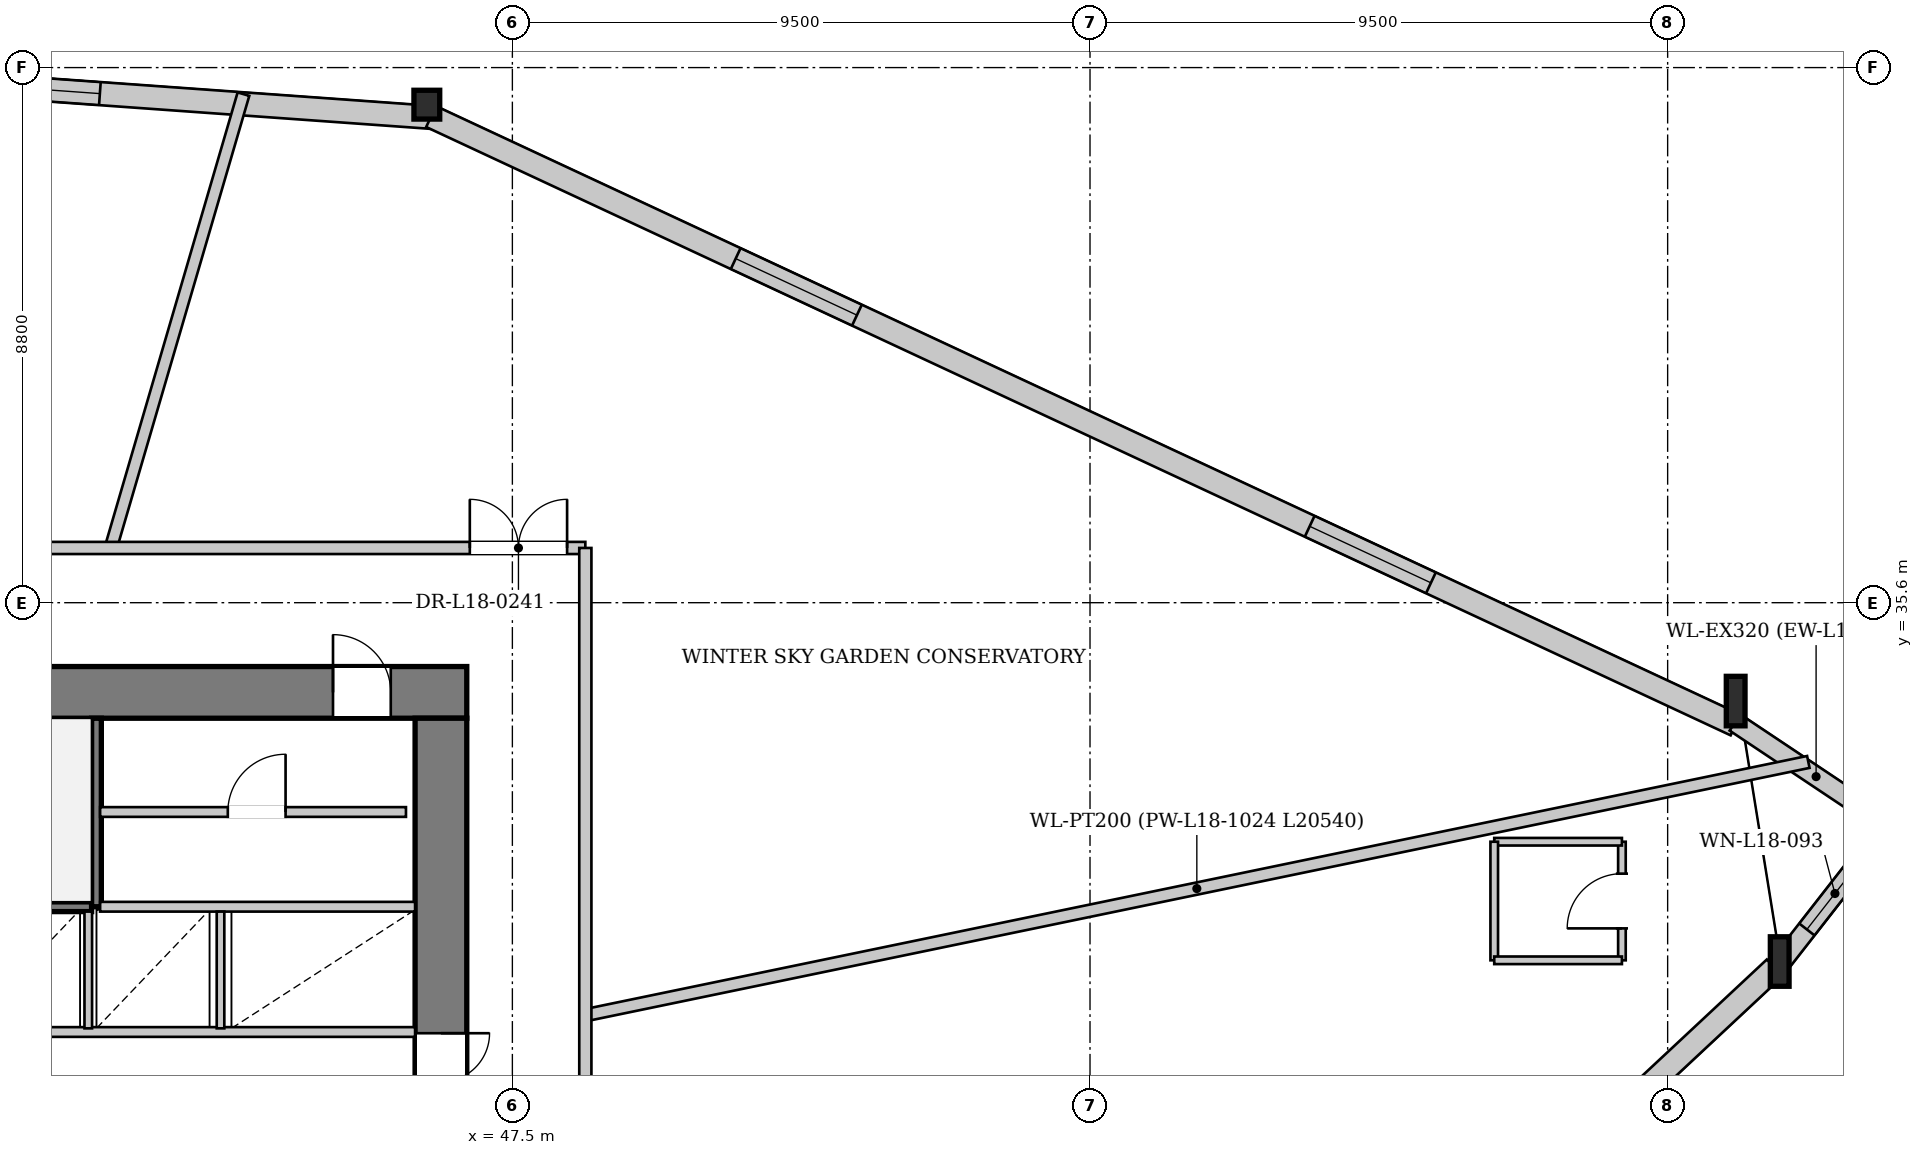
"""IFC4 building model, lengths in metres.
Left out: names, types, materials, properties, quantities, classifications, styles, units other than length and angle.
Written with IfcOpenShell. Run it as: python <this file> out.ifc"""

import sys

from ifc_helpers import new_model, si_unit, direction, frame, frame_2d, origin, origin_2d, place, context, subcontext, project, spatial, rectangle, i_section, extrude, source, transform, mapped, element, fill, save


model = new_model("IFC4")
c1 = context("Model", 3, precision=1e-05, world=origin(), true_north=direction((0.0, 1.0)))
c2 = subcontext(c1, "Body", "Model", "MODEL_VIEW")
j1 = project(units=[si_unit("LENGTHUNIT", "METRE"), si_unit("PLANEANGLEUNIT", "RADIAN")], contexts=[c1])
p1 = place(None, origin())
s1 = spatial("IfcSite", under=j1, at=p1, CompositionType="ELEMENT")
p2 = place(p1, origin())
s2 = spatial("IfcBuilding", under=s1, at=p2, CompositionType="ELEMENT")
p3 = place(p2, frame((0.0, 0.0, 71.9)))
s3 = spatial("IfcBuildingStorey", under=s2, at=p3, CompositionType="ELEMENT", Elevation=71.9)
m1 = source(origin(), c2, "Body", "SweptSolid", [
    extrude(i_section(OverallWidth=0.308, OverallDepth=0.814, WebThickness=0.021, FlangeThickness=0.04, at=origin_2d()), origin(), (0.0, 0.0, 1.0), 3.867),
])
p4 = place(p3, frame((68.391, 29.455, 0.0), z_axis=(-0.024620663351, 0.126133552244, 0.991707693796), x_axis=(-0.981477077245, -0.191579609672, 0.0)))
e1 = element("IfcColumn", 1, at=p4, inside=s3, PredefinedType="COLUMN", context=c2, shape_type="MappedRepresentation", body=[
    mapped(m1, transform((0.0, 0.0, 0.0), x_axis=(1.0, 0.0, 0.0), y_axis=(0.0, 1.0, 0.0), z_axis=(0.0, 0.0, 1.0), scale=1.0)),
])
m2 = source(origin(), c2, "Body", "SweptSolid", [
    extrude(i_section(OverallWidth=0.308, OverallDepth=0.814, WebThickness=0.021, FlangeThickness=0.04, at=origin_2d()), origin(), (0.0, 0.0, 1.0), 3.863),
])
p5 = place(p3, frame((67.697, 33.763, 0.0), z_axis=(-0.040443883228, 0.113558840876, 0.992707752548), x_axis=(-0.942038054794, -0.335506040661, 0.0)))
e2 = element("IfcColumn", 2, at=p5, inside=s3, PredefinedType="COLUMN", context=c2, shape_type="MappedRepresentation", body=[
    mapped(m2, transform((0.0, 0.0, 0.0), x_axis=(1.0, 0.0, 0.0), y_axis=(0.0, 1.0, 0.0), z_axis=(0.0, 0.0, 1.0), scale=1.0)),
])
m3 = source(origin(), c2, "Body", "SweptSolid", [
    extrude(i_section(OverallWidth=0.424, OverallDepth=0.474, WebThickness=0.043, FlangeThickness=0.068, at=origin_2d()), origin(), (0.0, 0.0, 1.0), 3.847),
])
p6 = place(p3, frame((46.243, 43.767, 0.0), z_axis=(-0.07792844441, 0.011930413314, 0.996887567778), x_axis=(-0.151331289077, -0.988483100992, 0.0)))
e3 = element("IfcColumn", 3, at=p6, inside=s3, PredefinedType="COLUMN", context=c2, shape_type="MappedRepresentation", body=[
    mapped(m3, transform((0.0, 0.0, 0.0), x_axis=(1.0, 0.0, 0.0), y_axis=(0.0, 1.0, 0.0), z_axis=(0.0, 0.0, 1.0), scale=1.0)),
])
p7 = place(p3, frame((22.618, 45.267, 0.0), z_axis=(0.0, 0.0, 1.0), x_axis=(0.997450631022, -0.071359923443, 0.0)))
e4 = element("IfcWall", 4, at=p7, inside=s3, PredefinedType="SOLIDWALL", context=c2, shape_type="SweptSolid", body=[
    extrude(rectangle(XDim=23.672, YDim=0.38, at=frame_2d((11.836, 0.0))), origin(), (0.0, 0.0, 1.0), 3.042),
])
p8 = place(p7, frame((5.528, 0.0, 0.65)))
e5 = element("IfcOpeningElement", 5, at=p8, cuts=e4, PredefinedType="OPENING", context=c2, shape_type="SweptSolid", body=[
    extrude(rectangle(XDim=2.2, YDim=2.25, at=frame_2d((1.1, 1.125))), frame((0.0, 0.2, 0.0), z_axis=(0.0, -1.0, 0.0), x_axis=(1.0, 0.0, 0.0)), (0.0, 0.0, 1.0), 0.4),
])
p9 = place(p7, frame((15.944, 0.0, 0.65)))
e6 = element("IfcOpeningElement", 6, at=p9, cuts=e4, PredefinedType="OPENING", context=c2, shape_type="SweptSolid", body=[
    extrude(rectangle(XDim=2.2, YDim=2.25, at=frame_2d((1.1, 1.125))), frame((0.0, 0.2, 0.0), z_axis=(0.0, -1.0, 0.0), x_axis=(1.0, 0.0, 0.0)), (0.0, 0.0, 1.0), 0.4),
])
p10 = place(p3, frame((46.163, 43.595, 0.0), z_axis=(0.0, 0.0, 1.0), x_axis=(0.906302989161, -0.422628550667, 0.0)))
e7 = element("IfcWall", 7, at=p10, inside=s3, PredefinedType="SOLIDWALL", context=c2, shape_type="SweptSolid", body=[
    extrude(rectangle(XDim=23.672, YDim=0.38, at=frame_2d((11.836, 0.0))), origin(), (0.0, 0.0, 1.0), 3.042),
])
p11 = place(p10, frame((5.528, 0.0, 0.65)))
e8 = element("IfcOpeningElement", 8, at=p11, cuts=e7, PredefinedType="OPENING", context=c2, shape_type="SweptSolid", body=[
    extrude(rectangle(XDim=2.2, YDim=2.25, at=frame_2d((1.1, 1.125))), frame((0.0, 0.2, 0.0), z_axis=(0.0, -1.0, 0.0), x_axis=(1.0, 0.0, 0.0)), (0.0, 0.0, 1.0), 0.4),
])
p12 = place(p10, frame((15.944, 0.0, 0.65)))
e9 = element("IfcOpeningElement", 9, at=p12, cuts=e7, PredefinedType="OPENING", context=c2, shape_type="SweptSolid", body=[
    extrude(rectangle(XDim=2.2, YDim=2.25, at=frame_2d((1.1, 1.125))), frame((0.0, 0.2, 0.0), z_axis=(0.0, -1.0, 0.0), x_axis=(1.0, 0.0, 0.0)), (0.0, 0.0, 1.0), 0.4),
])
p13 = place(p3, frame((67.608, 33.63, 0.0), z_axis=(0.0, 0.0, 1.0), x_axis=(0.831757330832, -0.55513939025, 0.0)))
e10 = element("IfcWall", 10, at=p13, inside=s3, PredefinedType="SOLIDWALL", context=c2, shape_type="SweptSolid", body=[
    extrude(rectangle(XDim=3.207, YDim=0.32, at=frame_2d((1.603, 0.0))), origin(), (0.0, 0.0, 1.0), 3.042),
])
p14 = place(p3, frame((70.238, 32.081, 0.0), z_axis=(0.0, 0.0, 1.0), x_axis=(-0.615310089373, -0.788285160279, 0.0)))
e11 = element("IfcWall", 11, at=p14, inside=s3, PredefinedType="SOLIDWALL", context=c2, shape_type="SweptSolid", body=[
    extrude(rectangle(XDim=3.207, YDim=0.32, at=frame_2d((1.604, 0.0))), origin(), (0.0, 0.0, 1.0), 3.042),
])
p15 = place(p14, frame((0.853, 0.0, 0.622)))
e12 = element("IfcOpeningElement", 12, at=p15, cuts=e11, PredefinedType="OPENING", context=c2, shape_type="SweptSolid", body=[
    extrude(rectangle(XDim=1.5, YDim=2.3, at=frame_2d((0.75, 1.15))), frame((0.0, 0.17, 0.0), z_axis=(0.0, -1.0, 0.0), x_axis=(1.0, 0.0, 0.0)), (0.0, 0.0, 1.0), 0.34),
])
p16 = place(p3, frame((68.261, 29.594, 0.0), z_axis=(0.0, 0.0, 1.0), x_axis=(-0.730910825088, -0.682472978051, 0.0)))
e13 = element("IfcWall", 13, at=p16, inside=s3, PredefinedType="SOLIDWALL", context=c2, shape_type="SweptSolid", body=[
    extrude(rectangle(XDim=24.284, YDim=0.38, at=frame_2d((12.142, 0.0))), origin(), (0.0, 0.0, 1.0), 3.042),
])
p17 = place(p16, frame((5.7, 0.0, 0.65)))
e14 = element("IfcOpeningElement", 14, at=p17, cuts=e13, PredefinedType="OPENING", context=c2, shape_type="SweptSolid", body=[
    extrude(rectangle(XDim=2.2, YDim=2.25, at=frame_2d((1.1, 1.125))), frame((0.0, 0.2, 0.0), z_axis=(0.0, -1.0, 0.0), x_axis=(1.0, 0.0, 0.0)), (0.0, 0.0, 1.0), 0.4),
])
p18 = place(p16, frame((17.485, 0.0, 0.65)))
e15 = element("IfcOpeningElement", 15, at=p18, cuts=e13, PredefinedType="OPENING", context=c2, shape_type="SweptSolid", body=[
    extrude(rectangle(XDim=2.2, YDim=2.25, at=frame_2d((1.1, 1.125))), frame((0.0, 0.2, 0.0), z_axis=(0.0, -1.0, 0.0), x_axis=(1.0, 0.0, 0.0)), (0.0, 0.0, 1.0), 0.4),
])
p19 = place(p3, frame((29.25, 34.125, 0.0), z_axis=(0.0, 0.0, 1.0), x_axis=(1.0, 0.0, 0.0)))
e16 = element("IfcWall", 16, at=p19, inside=s3, PredefinedType="SHEAR", context=c2, shape_type="SweptSolid", body=[
    extrude(rectangle(XDim=17.5, YDim=0.85, at=frame_2d((8.75, 0.0))), origin(), (0.0, 0.0, 1.0), 3.75),
])
p20 = place(p19, frame((1.85, 0.0, 0.0)))
e17 = element("IfcOpeningElement", 17, at=p20, cuts=e16, PredefinedType="OPENING", context=c2, shape_type="SweptSolid", body=[
    extrude(rectangle(XDim=0.95, YDim=2.1, at=frame_2d((0.475, 1.05))), frame((0.0, 0.435, 0.0), z_axis=(0.0, -1.0, 0.0), x_axis=(1.0, 0.0, 0.0)), (0.0, 0.0, 1.0), 0.87),
])
p21 = place(p19, frame((4.23, 0.0, 0.0)))
e18 = element("IfcOpeningElement", 18, at=p21, cuts=e16, PredefinedType="OPENING", context=c2, shape_type="SweptSolid", body=[
    extrude(rectangle(XDim=1.32, YDim=2.2, at=frame_2d((0.66, 1.1))), frame((0.0, 0.435, 0.0), z_axis=(0.0, -1.0, 0.0), x_axis=(1.0, 0.0, 0.0)), (0.0, 0.0, 1.0), 0.87),
])
p22 = place(p19, frame((15.3, 0.0, 0.0)))
e19 = element("IfcOpeningElement", 19, at=p22, cuts=e16, PredefinedType="OPENING", context=c2, shape_type="SweptSolid", body=[
    extrude(rectangle(XDim=0.95, YDim=2.1, at=frame_2d((0.475, 1.05))), frame((0.0, 0.435, 0.0), z_axis=(0.0, -1.0, 0.0), x_axis=(1.0, 0.0, 0.0)), (0.0, 0.0, 1.0), 0.87),
])
p23 = place(p3, frame((46.325, 33.7, 0.0), z_axis=(0.0, 0.0, 1.0), x_axis=(0.0, -1.0, 0.0)))
e20 = element("IfcWall", 20, at=p23, inside=s3, PredefinedType="SHEAR", context=c2, shape_type="SweptSolid", body=[
    extrude(rectangle(XDim=14.2, YDim=0.85, at=frame_2d((7.1, 0.0))), origin(), (0.0, 0.0, 1.0), 3.75),
])
p24 = place(p23, frame((5.18, 0.0, 0.0)))
e21 = element("IfcOpeningElement", 21, at=p24, cuts=e20, PredefinedType="OPENING", context=c2, shape_type="SweptSolid", body=[
    extrude(rectangle(XDim=1.6, YDim=2.2, at=frame_2d((0.8, 1.1))), frame((0.0, 0.435, 0.0), z_axis=(0.0, -1.0, 0.0), x_axis=(1.0, 0.0, 0.0)), (0.0, 0.0, 1.0), 0.87),
])
p25 = place(p3, frame((33.28, 30.6, 0.0), z_axis=(0.0, 0.0, 1.0), x_axis=(1.0, 0.0, 0.0)))
e22 = element("IfcWall", 22, at=p25, inside=s3, PredefinedType="PARTITIONING", context=c2, shape_type="SweptSolid", body=[
    extrude(rectangle(XDim=7.3, YDim=0.16, at=frame_2d((3.65, 0.0))), origin(), (0.0, 0.0, 1.0), 3.75),
])
p26 = place(p3, frame((40.66, 30.6, 0.0), z_axis=(0.0, 0.0, 1.0), x_axis=(0.0, 1.0, 0.0)))
e23 = element("IfcWall", 23, at=p26, inside=s3, PredefinedType="PARTITIONING", context=c2, shape_type="SweptSolid", body=[
    extrude(rectangle(XDim=3.1, YDim=0.16, at=frame_2d((1.55, 0.0))), origin(), (0.0, 0.0, 1.0), 3.75),
])
p27 = place(p3, frame((33.28, 28.54, 0.0), z_axis=(0.0, 0.0, 1.0), x_axis=(1.0, 0.0, 0.0)))
e24 = element("IfcWall", 24, at=p27, inside=s3, PredefinedType="PARTITIONING", context=c2, shape_type="SweptSolid", body=[
    extrude(rectangle(XDim=12.62, YDim=0.16, at=frame_2d((6.31, 0.0))), origin(), (0.0, 0.0, 1.0), 3.75),
])
p28 = place(p3, frame((40.72, 30.6, 0.0), z_axis=(0.0, 0.0, 1.0), x_axis=(1.0, 0.0, 0.0)))
e25 = element("IfcWall", 25, at=p28, inside=s3, PredefinedType="PARTITIONING", context=c2, shape_type="SweptSolid", body=[
    extrude(rectangle(XDim=5.18, YDim=0.16, at=frame_2d((2.59, 0.0))), origin(), (0.0, 0.0, 1.0), 3.75),
])
for number, where, z_axis, x_axis in (
    (26, (40.525, 28.6, 0.0), (0.0, 0.0, 1.0), (0.0, 1.0, 0.0)),
    (27, (42.7, 28.6, 0.0), (0.0, 0.0, 1.0), (0.0, 1.0, 0.0)),
):
    element("IfcWall", number, at=place(p3, frame(where, z_axis=z_axis, x_axis=x_axis)), inside=s3, PredefinedType="PARTITIONING", context=c2, shape_type="SweptSolid", body=[
        extrude(rectangle(XDim=1.92, YDim=0.125, at=frame_2d((0.96, 0.0))), origin(), (0.0, 0.0, 1.0), 3.75),
    ])
p29 = place(p3, frame((40.72, 32.158, 0.0), z_axis=(0.0, 0.0, 1.0), x_axis=(1.0, 0.0, 0.0)))
e28 = element("IfcWall", 28, at=p29, inside=s3, PredefinedType="PARTITIONING", context=c2, shape_type="SweptSolid", body=[
    extrude(rectangle(XDim=5.03, YDim=0.16, at=frame_2d((2.515, 0.0))), origin(), (0.0, 0.0, 1.0), 3.75),
])
p30 = place(p29, frame((2.1, 0.0, 0.0)))
e29 = element("IfcOpeningElement", 29, at=p30, cuts=e28, PredefinedType="OPENING", context=c2, shape_type="SweptSolid", body=[
    extrude(rectangle(XDim=0.95, YDim=2.1, at=frame_2d((0.475, 1.05))), frame((0.0, 0.09, 0.0), z_axis=(0.0, -1.0, 0.0), x_axis=(1.0, 0.0, 0.0)), (0.0, 0.0, 1.0), 0.18),
])
p31 = place(p3, frame((48.7, 28.816, 0.0), z_axis=(0.0, 0.0, 1.0), x_axis=(0.979223566827, 0.202783643746, 0.0)))
e30 = element("IfcWall", 30, at=p31, inside=s3, PredefinedType="PARTITIONING", context=c2, shape_type="SweptSolid", body=[
    extrude(rectangle(XDim=20.541, YDim=0.2, at=frame_2d((10.27, 0.0))), origin(), (0.0, 0.0, 1.0), 3.245),
])
p32 = place(p3, frame((40.895, 36.5, 0.0), z_axis=(0.0, 0.0, 1.0), x_axis=(0.280658217251, 0.959807775072, 0.0)))
e31 = element("IfcWall", 31, at=p32, inside=s3, PredefinedType="PARTITIONING", context=c2, shape_type="SweptSolid", body=[
    extrude(rectangle(XDim=7.776, YDim=0.2, at=frame_2d((3.888, 0.0))), origin(), (0.0, 0.0, 1.0), 3.75),
])
p33 = place(p3, frame((65.748, 29.719, 0.0), z_axis=(0.0, 0.0, 1.0), x_axis=(0.0, 1.0, 0.0)))
e32 = element("IfcWall", 32, at=p33, inside=s3, PredefinedType="PARTITIONING", context=c2, shape_type="SweptSolid", body=[
    extrude(rectangle(XDim=1.95, YDim=0.125, at=frame_2d((0.975, 0.0))), origin(), (0.0, 0.0, 1.0), 3.75),
])
p34 = place(p33, frame((0.525, 0.0, 0.0)))
e33 = element("IfcOpeningElement", 33, at=p34, cuts=e32, PredefinedType="OPENING", context=c2, shape_type="SweptSolid", body=[
    extrude(rectangle(XDim=0.9, YDim=2.1, at=frame_2d((0.45, 1.05))), frame((0.0, 0.073, 0.0), z_axis=(0.0, -1.0, 0.0), x_axis=(1.0, 0.0, 0.0)), (0.0, 0.0, 1.0), 0.145),
])
p35 = place(p3, frame((65.748, 31.669, 0.0), z_axis=(0.0, 0.0, 1.0), x_axis=(-1.0, 0.0, 0.0)))
e34 = element("IfcWall", 34, at=p35, inside=s3, PredefinedType="PARTITIONING", context=c2, shape_type="SweptSolid", body=[
    extrude(rectangle(XDim=2.1, YDim=0.125, at=frame_2d((1.05, 0.0))), origin(), (0.0, 0.0, 1.0), 3.245),
])
p36 = place(p3, frame((63.648, 31.669, 0.0), z_axis=(0.0, 0.0, 1.0), x_axis=(0.0, -1.0, 0.0)))
e35 = element("IfcWall", 35, at=p36, inside=s3, PredefinedType="PARTITIONING", context=c2, shape_type="SweptSolid", body=[
    extrude(rectangle(XDim=1.95, YDim=0.125, at=frame_2d((0.975, 0.0))), origin(), (0.0, 0.0, 1.0), 3.75),
])
p37 = place(p3, frame((63.648, 29.719, 0.0), z_axis=(0.0, 0.0, 1.0), x_axis=(1.0, 0.0, 0.0)))
e36 = element("IfcWall", 36, at=p37, inside=s3, PredefinedType="PARTITIONING", context=c2, shape_type="SweptSolid", body=[
    extrude(rectangle(XDim=2.1, YDim=0.125, at=frame_2d((1.05, 0.0))), origin(), (0.0, 0.0, 1.0), 3.245),
])
p38 = place(p3, frame((27.3, 36.5, 0.0), z_axis=(0.0, 0.0, 1.0), x_axis=(1.0, 0.0, 0.0)))
e37 = element("IfcWall", 37, at=p38, inside=s3, PredefinedType="PARTITIONING", context=c2, shape_type="SweptSolid", body=[
    extrude(rectangle(XDim=21.4, YDim=0.2, at=frame_2d((10.7, 0.0))), origin(), (0.0, 0.0, 1.0), 3.75),
])
p39 = place(p38, frame((19.5, 0.0, 0.0)))
e38 = element("IfcOpeningElement", 38, at=p39, cuts=e37, PredefinedType="OPENING", context=c2, shape_type="SweptSolid", body=[
    extrude(rectangle(XDim=1.6, YDim=2.2, at=frame_2d((0.8, 1.1))), frame((0.0, 0.11, 0.0), z_axis=(0.0, -1.0, 0.0), x_axis=(1.0, 0.0, 0.0)), (0.0, 0.0, 1.0), 0.22),
])
p40 = place(p38, frame((6.572, 0.0, 0.0)))
e39 = element("IfcOpeningElement", 39, at=p40, cuts=e37, PredefinedType="OPENING", context=c2, shape_type="SweptSolid", body=[
    extrude(rectangle(XDim=0.98, YDim=2.15, at=frame_2d((0.49, 1.075))), frame((0.0, 0.11, 0.0), z_axis=(0.0, -1.0, 0.0), x_axis=(1.0, 0.0, 0.0)), (0.0, 0.0, 1.0), 0.22),
])
p41 = place(p3, frame((48.7, 16.7, 0.0), z_axis=(0.0, 0.0, 1.0), x_axis=(0.0, 1.0, 0.0)))
e40 = element("IfcWall", 40, at=p41, inside=s3, PredefinedType="PARTITIONING", context=c2, shape_type="SweptSolid", body=[
    extrude(rectangle(XDim=19.8, YDim=0.2, at=frame_2d((9.9, 0.0))), origin(), (0.0, 0.0, 1.0), 3.75),
])
p42 = place(p41, frame((8.09, 0.0, 0.0)))
e41 = element("IfcOpeningElement", 41, at=p42, cuts=e40, PredefinedType="OPENING", context=c2, shape_type="SweptSolid", body=[
    extrude(rectangle(XDim=0.98, YDim=2.15, at=frame_2d((0.49, 1.075))), frame((0.0, 0.11, 0.0), z_axis=(0.0, -1.0, 0.0), x_axis=(1.0, 0.0, 0.0)), (0.0, 0.0, 1.0), 0.22),
])
m4 = source(origin(), c2, "Body", "SweptSolid", [
    extrude(rectangle(XDim=2.2, YDim=2.25, at=frame_2d((1.1, 1.125))), frame((0.0, 0.03, 0.0), z_axis=(0.0, -1.0, 0.0), x_axis=(1.0, 0.0, 0.0)), (0.0, 0.0, 1.0), 0.06),
])
p43 = place(p9, origin())
e42 = element("IfcWindow", 42, at=p43, inside=s3, PartitioningType="SINGLE_PANEL", PredefinedType="WINDOW", context=c2, shape_type="MappedRepresentation", body=[
    mapped(m4, transform((0.0, 0.0, 0.0), x_axis=(1.0, 0.0, 0.0), y_axis=(0.0, 1.0, 0.0), z_axis=(0.0, 0.0, 1.0), scale=1.0)),
])
fill(e6, e42)
p44 = place(p11, origin())
e43 = element("IfcWindow", 43, at=p44, inside=s3, PartitioningType="SINGLE_PANEL", PredefinedType="WINDOW", context=c2, shape_type="MappedRepresentation", body=[
    mapped(m4, transform((0.0, 0.0, 0.0), x_axis=(1.0, 0.0, 0.0), y_axis=(0.0, 1.0, 0.0), z_axis=(0.0, 0.0, 1.0), scale=1.0)),
])
fill(e8, e43)
p45 = place(p12, origin())
e44 = element("IfcWindow", 44, at=p45, inside=s3, PartitioningType="SINGLE_PANEL", PredefinedType="WINDOW", context=c2, shape_type="MappedRepresentation", body=[
    mapped(m4, transform((0.0, 0.0, 0.0), x_axis=(1.0, 0.0, 0.0), y_axis=(0.0, 1.0, 0.0), z_axis=(0.0, 0.0, 1.0), scale=1.0)),
])
fill(e9, e44)
m5 = source(origin(), c2, "Body", "SweptSolid", [
    extrude(rectangle(XDim=1.5, YDim=2.3, at=frame_2d((0.75, 1.15))), frame((0.0, 0.03, 0.0), z_axis=(0.0, -1.0, 0.0), x_axis=(1.0, 0.0, 0.0)), (0.0, 0.0, 1.0), 0.06),
])
p46 = place(p15, origin())
e45 = element("IfcWindow", 45, at=p46, inside=s3, PartitioningType="SINGLE_PANEL", PredefinedType="WINDOW", context=c2, shape_type="MappedRepresentation", body=[
    mapped(m5, transform((0.0, 0.0, 0.0), x_axis=(1.0, 0.0, 0.0), y_axis=(0.0, 1.0, 0.0), z_axis=(0.0, 0.0, 1.0), scale=1.0)),
])
fill(e12, e45)
m6 = source(origin(), c2, "Body", "SweptSolid", [
    extrude(rectangle(XDim=1.6, YDim=2.2, at=frame_2d((0.8, 1.1))), frame((0.0, 0.025, 0.0), z_axis=(0.0, -1.0, 0.0), x_axis=(1.0, 0.0, 0.0)), (0.0, 0.0, 1.0), 0.05),
])
p47 = place(p24, origin())
e46 = element("IfcDoor", 46, at=p47, inside=s3, OperationType="DOUBLE_DOOR_SINGLE_SWING", PredefinedType="DOOR", context=c2, shape_type="MappedRepresentation", body=[
    mapped(m6, transform((0.0, 0.0, 0.0), x_axis=(1.0, 0.0, 0.0), y_axis=(0.0, 1.0, 0.0), z_axis=(0.0, 0.0, 1.0), scale=1.0)),
])
fill(e21, e46)
m7 = source(origin(), c2, "Body", "SweptSolid", [
    extrude(rectangle(XDim=0.95, YDim=2.1, at=frame_2d((0.475, 1.05))), frame((0.0, 0.025, 0.0), z_axis=(0.0, -1.0, 0.0), x_axis=(1.0, 0.0, 0.0)), (0.0, 0.0, 1.0), 0.05),
])
p48 = place(p30, origin())
e47 = element("IfcDoor", 47, at=p48, inside=s3, OperationType="SINGLE_SWING_RIGHT", PredefinedType="DOOR", context=c2, shape_type="MappedRepresentation", body=[
    mapped(m7, transform((0.0, 0.0, 0.0), x_axis=(1.0, 0.0, 0.0), y_axis=(0.0, 1.0, 0.0), z_axis=(0.0, 0.0, 1.0), scale=1.0)),
])
fill(e29, e47)
p49 = place(p22, origin())
e48 = element("IfcDoor", 48, at=p49, inside=s3, OperationType="SINGLE_SWING_LEFT", PredefinedType="DOOR", context=c2, shape_type="MappedRepresentation", body=[
    mapped(m7, transform((0.0, 0.0, 0.0), x_axis=(1.0, 0.0, 0.0), y_axis=(0.0, 1.0, 0.0), z_axis=(0.0, 0.0, 1.0), scale=1.0)),
])
fill(e19, e48)
m8 = source(origin(), c2, "Body", "SweptSolid", [
    extrude(rectangle(XDim=0.9, YDim=2.1, at=frame_2d((0.45, 1.05))), frame((0.0, 0.025, 0.0), z_axis=(0.0, -1.0, 0.0), x_axis=(1.0, 0.0, 0.0)), (0.0, 0.0, 1.0), 0.05),
])
p50 = place(p34, origin())
e49 = element("IfcDoor", 49, at=p50, inside=s3, OperationType="SINGLE_SWING_LEFT", PredefinedType="DOOR", context=c2, shape_type="MappedRepresentation", body=[
    mapped(m8, transform((0.0, 0.0, 0.0), x_axis=(1.0, 0.0, 0.0), y_axis=(0.0, 1.0, 0.0), z_axis=(0.0, 0.0, 1.0), scale=1.0)),
])
fill(e33, e49)
p51 = place(p39, origin())
e50 = element("IfcDoor", 50, at=p51, inside=s3, OperationType="DOUBLE_DOOR_SINGLE_SWING", PredefinedType="DOOR", context=c2, shape_type="MappedRepresentation", body=[
    mapped(m6, transform((0.0, 0.0, 0.0), x_axis=(1.0, 0.0, 0.0), y_axis=(0.0, 1.0, 0.0), z_axis=(0.0, 0.0, 1.0), scale=1.0)),
])
fill(e38, e50)
save(model, sys.argv[1])
